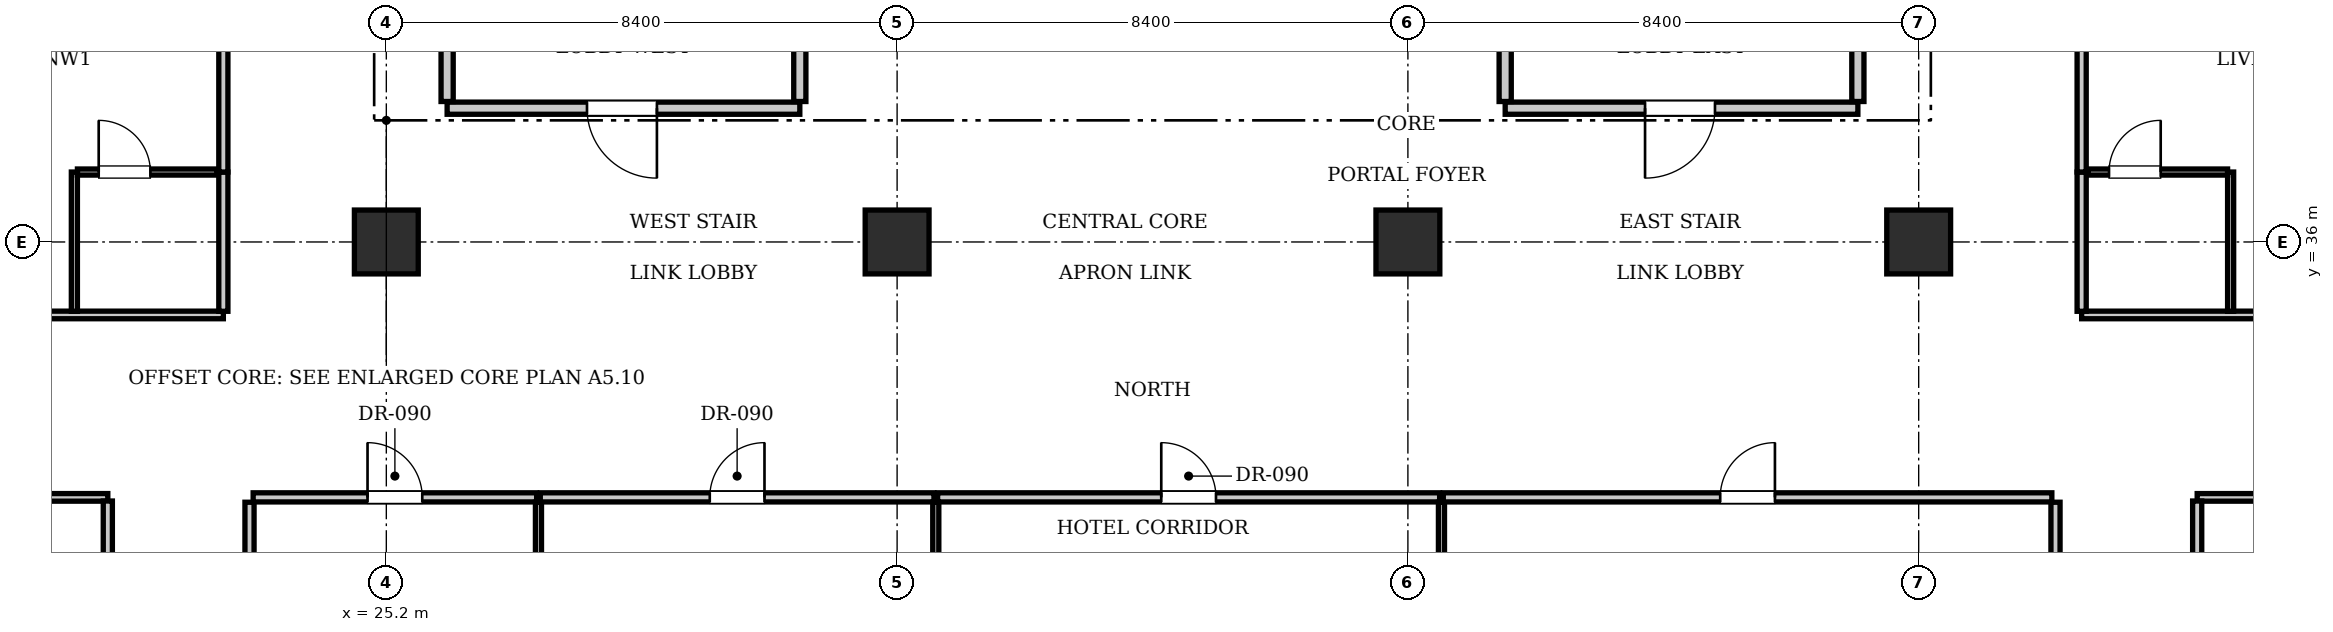
"""IFC4 building model, lengths in metres.
Left out: names, types, materials, properties, quantities, classifications, styles, units other than length and angle.
Written with IfcOpenShell. Run it as: python <this file> out.ifc"""

import sys

from ifc_helpers import new_model, si_unit, direction, frame, frame_2d, origin, origin_2d, place, context, subcontext, project, spatial, rectangle, extrude, element, fill, save


model = new_model("IFC4")
c1 = context("Model", 3, precision=1e-05, world=origin(), true_north=direction((0.0, 1.0)))
c2 = subcontext(c1, "Body", "Model", "MODEL_VIEW")
j1 = project(units=[si_unit("LENGTHUNIT", "METRE"), si_unit("PLANEANGLEUNIT", "RADIAN")], contexts=[c1])
p1 = place(None, origin())
s1 = spatial("IfcSite", under=j1, at=p1, CompositionType="ELEMENT")
p2 = place(p1, origin())
s2 = spatial("IfcBuilding", under=s1, at=p2, CompositionType="ELEMENT")
p3 = place(p2, frame((0.0, 0.0, 92.4)))
s3 = spatial("IfcBuildingStorey", under=s2, at=p3, CompositionType="ELEMENT", Elevation=92.4)
for number, where, z_axis, x_axis in (
    (1, (25.2, 36.0, 0.0), (0.0, 0.0, 1.0), (1.0, 0.0, 0.0)),
    (2, (33.6, 36.0, 0.0), (0.0, 0.0, 1.0), (1.0, 0.0, 0.0)),
    (3, (42.0, 36.0, 0.0), (0.0, 0.0, 1.0), (1.0, 0.0, 0.0)),
    (4, (50.4, 36.0, 0.0), (0.0, 0.0, 1.0), (1.0, 0.0, 0.0)),
):
    element("IfcColumn", number, at=place(p3, frame(where, z_axis=z_axis, x_axis=x_axis)), inside=s3, PredefinedType="COLUMN", context=c2, shape_type="SweptSolid", body=[
        extrude(rectangle(XDim=1.05, YDim=1.05, at=origin_2d()), origin(), (0.0, 0.0, 1.0), 3.85),
    ])
p4 = place(p3, frame((26.2, 38.2, 0.0), z_axis=(0.0, 0.0, 1.0), x_axis=(1.0, 0.0, 0.0)))
e5 = element("IfcWall", 5, at=p4, inside=s3, PredefinedType="PARTITIONING", context=c2, shape_type="SweptSolid", body=[
    extrude(rectangle(XDim=5.8, YDim=0.2, at=frame_2d((2.9, 0.0))), origin(), (0.0, 0.0, 1.0), 3.61),
])
p5 = place(p4, frame((2.3, 0.0, 0.0)))
e6 = element("IfcOpeningElement", 6, at=p5, cuts=e5, PredefinedType="OPENING", context=c2, shape_type="SweptSolid", body=[
    extrude(rectangle(XDim=1.15, YDim=2.15, at=frame_2d((0.575, 1.075))), frame((0.0, 0.11, 0.0), z_axis=(0.0, -1.0, 0.0), x_axis=(1.0, 0.0, 0.0)), (0.0, 0.0, 1.0), 0.22),
])
for number, where, z_axis, x_axis in (
    (7, (26.2, 38.31, 0.0), (0.0, 0.0, 1.0), (0.0, 1.0, 0.0)),
    (8, (32.0, 38.31, 0.0), (0.0, 0.0, 1.0), (0.0, 1.0, 0.0)),
):
    element("IfcWall", number, at=place(p3, frame(where, z_axis=z_axis, x_axis=x_axis)), inside=s3, PredefinedType="PARTITIONING", context=c2, shape_type="SweptSolid", body=[
        extrude(rectangle(XDim=3.07, YDim=0.2, at=frame_2d((1.535, 0.0))), origin(), (0.0, 0.0, 1.0), 3.61),
    ])
p6 = place(p3, frame((43.6, 38.2, 0.0), z_axis=(0.0, 0.0, 1.0), x_axis=(1.0, 0.0, 0.0)))
e9 = element("IfcWall", 9, at=p6, inside=s3, PredefinedType="PARTITIONING", context=c2, shape_type="SweptSolid", body=[
    extrude(rectangle(XDim=5.8, YDim=0.2, at=frame_2d((2.9, 0.0))), origin(), (0.0, 0.0, 1.0), 3.61),
])
p7 = place(p6, frame((2.3, 0.0, 0.0)))
e10 = element("IfcOpeningElement", 10, at=p7, cuts=e9, PredefinedType="OPENING", context=c2, shape_type="SweptSolid", body=[
    extrude(rectangle(XDim=1.15, YDim=2.15, at=frame_2d((0.575, 1.075))), frame((0.0, 0.11, 0.0), z_axis=(0.0, -1.0, 0.0), x_axis=(1.0, 0.0, 0.0)), (0.0, 0.0, 1.0), 0.22),
])
for number, where, z_axis, x_axis in (
    (11, (43.6, 38.31, 0.0), (0.0, 0.0, 1.0), (0.0, 1.0, 0.0)),
    (12, (49.4, 38.31, 0.0), (0.0, 0.0, 1.0), (0.0, 1.0, 0.0)),
):
    element("IfcWall", number, at=place(p3, frame(where, z_axis=z_axis, x_axis=x_axis)), inside=s3, PredefinedType="PARTITIONING", context=c2, shape_type="SweptSolid", body=[
        extrude(rectangle(XDim=3.07, YDim=0.2, at=frame_2d((1.535, 0.0))), origin(), (0.0, 0.0, 1.0), 3.61),
    ])
for number, where, z_axis, x_axis in (
    (13, (22.95, 23.28, 0.0), (0.0, 0.0, 1.0), (0.0, 1.0, 0.0)),
    (14, (52.65, 23.28, 0.0), (0.0, 0.0, 1.0), (0.0, 1.0, 0.0)),
):
    element("IfcWall", number, at=place(p3, frame(where, z_axis=z_axis, x_axis=x_axis)), inside=s3, PredefinedType="PARTITIONING", context=c2, shape_type="SweptSolid", body=[
        extrude(rectangle(XDim=8.44, YDim=0.15, at=frame_2d((4.22, 0.0))), origin(), (0.0, 0.0, 1.0), 3.61),
    ])
p8 = place(p3, frame((23.01, 31.8, 0.0), z_axis=(0.0, 0.0, 1.0), x_axis=(1.0, 0.0, 0.0)))
e15 = element("IfcWall", 15, at=p8, inside=s3, PredefinedType="PARTITIONING", context=c2, shape_type="SweptSolid", body=[
    extrude(rectangle(XDim=4.662, YDim=0.15, at=frame_2d((2.331, 0.0))), origin(), (0.0, 0.0, 1.0), 3.61),
])
p9 = place(p8, frame((1.881, 0.0, 0.0)))
e16 = element("IfcOpeningElement", 16, at=p9, cuts=e15, PredefinedType="OPENING", context=c2, shape_type="SweptSolid", body=[
    extrude(rectangle(XDim=0.9, YDim=2.1, at=frame_2d((0.45, 1.05))), frame((0.0, 0.085, 0.0), z_axis=(0.0, -1.0, 0.0), x_axis=(1.0, 0.0, 0.0)), (0.0, 0.0, 1.0), 0.17),
])
p10 = place(p3, frame((27.702, 23.28, 0.0), z_axis=(0.0, 0.0, 1.0), x_axis=(0.0, 1.0, 0.0)))
e17 = element("IfcWall", 17, at=p10, inside=s3, PredefinedType="PARTITIONING", context=c2, shape_type="SweptSolid", body=[
    extrude(rectangle(XDim=8.44, YDim=0.1, at=frame_2d((4.22, 0.0))), origin(), (0.0, 0.0, 1.0), 3.61),
])
p11 = place(p3, frame((27.732, 31.8, 0.0), z_axis=(0.0, 0.0, 1.0), x_axis=(1.0, 0.0, 0.0)))
e18 = element("IfcWall", 18, at=p11, inside=s3, PredefinedType="PARTITIONING", context=c2, shape_type="SweptSolid", body=[
    extrude(rectangle(XDim=6.474, YDim=0.15, at=frame_2d((3.237, 0.0))), origin(), (0.0, 0.0, 1.0), 3.61),
])
p12 = place(p11, frame((2.787, 0.0, 0.0)))
e19 = element("IfcOpeningElement", 19, at=p12, cuts=e18, PredefinedType="OPENING", context=c2, shape_type="SweptSolid", body=[
    extrude(rectangle(XDim=0.9, YDim=2.1, at=frame_2d((0.45, 1.05))), frame((0.0, 0.085, 0.0), z_axis=(0.0, -1.0, 0.0), x_axis=(1.0, 0.0, 0.0)), (0.0, 0.0, 1.0), 0.17),
])
p13 = place(p3, frame((34.236, 23.28, 0.0), z_axis=(0.0, 0.0, 1.0), x_axis=(0.0, 1.0, 0.0)))
e20 = element("IfcWall", 20, at=p13, inside=s3, PredefinedType="PARTITIONING", context=c2, shape_type="SweptSolid", body=[
    extrude(rectangle(XDim=8.44, YDim=0.1, at=frame_2d((4.22, 0.0))), origin(), (0.0, 0.0, 1.0), 3.61),
])
p14 = place(p3, frame((34.266, 31.8, 0.0), z_axis=(0.0, 0.0, 1.0), x_axis=(1.0, 0.0, 0.0)))
e21 = element("IfcWall", 21, at=p14, inside=s3, PredefinedType="PARTITIONING", context=c2, shape_type="SweptSolid", body=[
    extrude(rectangle(XDim=8.256, YDim=0.15, at=frame_2d((4.128, 0.0))), origin(), (0.0, 0.0, 1.0), 3.61),
])
p15 = place(p14, frame((3.678, 0.0, 0.0)))
e22 = element("IfcOpeningElement", 22, at=p15, cuts=e21, PredefinedType="OPENING", context=c2, shape_type="SweptSolid", body=[
    extrude(rectangle(XDim=0.9, YDim=2.1, at=frame_2d((0.45, 1.05))), frame((0.0, 0.085, 0.0), z_axis=(0.0, -1.0, 0.0), x_axis=(1.0, 0.0, 0.0)), (0.0, 0.0, 1.0), 0.17),
])
p16 = place(p3, frame((42.552, 23.28, 0.0), z_axis=(0.0, 0.0, 1.0), x_axis=(0.0, 1.0, 0.0)))
e23 = element("IfcWall", 23, at=p16, inside=s3, PredefinedType="PARTITIONING", context=c2, shape_type="SweptSolid", body=[
    extrude(rectangle(XDim=8.44, YDim=0.1, at=frame_2d((4.22, 0.0))), origin(), (0.0, 0.0, 1.0), 3.61),
])
p17 = place(p3, frame((42.582, 31.8, 0.0), z_axis=(0.0, 0.0, 1.0), x_axis=(1.0, 0.0, 0.0)))
e24 = element("IfcWall", 24, at=p17, inside=s3, PredefinedType="PARTITIONING", context=c2, shape_type="SweptSolid", body=[
    extrude(rectangle(XDim=10.008, YDim=0.15, at=frame_2d((5.004, 0.0))), origin(), (0.0, 0.0, 1.0), 3.61),
])
p18 = place(p17, frame((4.554, 0.0, 0.0)))
e25 = element("IfcOpeningElement", 25, at=p18, cuts=e24, PredefinedType="OPENING", context=c2, shape_type="SweptSolid", body=[
    extrude(rectangle(XDim=0.9, YDim=2.1, at=frame_2d((0.45, 1.05))), frame((0.0, 0.085, 0.0), z_axis=(0.0, -1.0, 0.0), x_axis=(1.0, 0.0, 0.0)), (0.0, 0.0, 1.0), 0.17),
])
p19 = place(p3, frame((10.9, 31.8, 0.0), z_axis=(0.0, 0.0, 1.0), x_axis=(1.0, 0.0, 0.0)))
e26 = element("IfcWall", 26, at=p19, inside=s3, PredefinedType="PARTITIONING", context=c2, shape_type="SweptSolid", body=[
    extrude(rectangle(XDim=9.72, YDim=0.125, at=frame_2d((4.86, 0.0))), origin(), (0.0, 0.0, 1.0), 3.61),
])
p20 = place(p3, frame((54.98, 31.8, 0.0), z_axis=(0.0, 0.0, 1.0), x_axis=(1.0, 0.0, 0.0)))
e27 = element("IfcWall", 27, at=p20, inside=s3, PredefinedType="PARTITIONING", context=c2, shape_type="SweptSolid", body=[
    extrude(rectangle(XDim=9.72, YDim=0.125, at=frame_2d((4.86, 0.0))), origin(), (0.0, 0.0, 1.0), 3.61),
])
for number, where, z_axis, x_axis in (
    (28, (20.62, 29.72, 0.0), (0.0, 0.0, 1.0), (0.0, 1.0, 0.0)),
    (29, (54.98, 29.72, 0.0), (0.0, 0.0, 1.0), (0.0, 1.0, 0.0)),
):
    element("IfcWall", number, at=place(p3, frame(where, z_axis=z_axis, x_axis=x_axis)), inside=s3, PredefinedType="PARTITIONING", context=c2, shape_type="SweptSolid", body=[
        extrude(rectangle(XDim=2.02, YDim=0.15, at=frame_2d((1.01, 0.0))), origin(), (0.0, 0.0, 1.0), 3.61),
    ])
p21 = place(p3, frame((10.9, 34.8, 0.0), z_axis=(0.0, 0.0, 1.0), x_axis=(1.0, 0.0, 0.0)))
e30 = element("IfcWall", 30, at=p21, inside=s3, PredefinedType="PARTITIONING", context=c2, shape_type="SweptSolid", body=[
    extrude(rectangle(XDim=11.62, YDim=0.125, at=frame_2d((5.81, 0.0))), origin(), (0.0, 0.0, 1.0), 3.61),
])
p22 = place(p3, frame((53.08, 34.8, 0.0), z_axis=(0.0, 0.0, 1.0), x_axis=(1.0, 0.0, 0.0)))
e31 = element("IfcWall", 31, at=p22, inside=s3, PredefinedType="PARTITIONING", context=c2, shape_type="SweptSolid", body=[
    extrude(rectangle(XDim=11.62, YDim=0.125, at=frame_2d((5.81, 0.0))), origin(), (0.0, 0.0, 1.0), 3.61),
])
p23 = place(p3, frame((22.52, 34.86, 0.0), z_axis=(0.0, 0.0, 1.0), x_axis=(0.0, 1.0, 0.0)))
e32 = element("IfcWall", 32, at=p23, inside=s3, PredefinedType="PARTITIONING", context=c2, shape_type="SweptSolid", body=[
    extrude(rectangle(XDim=2.29, YDim=0.15, at=frame_2d((1.145, 0.0))), origin(), (0.0, 0.0, 1.0), 3.61),
])
p24 = place(p3, frame((22.52, 37.15, 0.0), z_axis=(0.0, 0.0, 1.0), x_axis=(0.0, 1.0, 0.0)))
e33 = element("IfcWall", 33, at=p24, inside=s3, PredefinedType="PARTITIONING", context=c2, shape_type="SweptSolid", body=[
    extrude(rectangle(XDim=5.359, YDim=0.15, at=frame_2d((2.679, 0.0))), origin(), (0.0, 0.0, 1.0), 3.61),
])
p25 = place(p24, frame((2.204, 0.0, 0.0)))
e34 = element("IfcOpeningElement", 34, at=p25, cuts=e33, PredefinedType="OPENING", context=c2, shape_type="SweptSolid", body=[
    extrude(rectangle(XDim=0.95, YDim=2.15, at=frame_2d((0.475, 1.075))), frame((0.0, 0.085, 0.0), z_axis=(0.0, -1.0, 0.0), x_axis=(1.0, 0.0, 0.0)), (0.0, 0.0, 1.0), 0.17),
])
p26 = place(p3, frame((20.07, 34.86, 0.0), z_axis=(0.0, 0.0, 1.0), x_axis=(0.0, 1.0, 0.0)))
e35 = element("IfcWall", 35, at=p26, inside=s3, PredefinedType="PARTITIONING", context=c2, shape_type="SweptSolid", body=[
    extrude(rectangle(XDim=2.29, YDim=0.1, at=frame_2d((1.145, 0.0))), origin(), (0.0, 0.0, 1.0), 3.61),
])
p27 = place(p3, frame((20.12, 37.15, 0.0), z_axis=(0.0, 0.0, 1.0), x_axis=(1.0, 0.0, 0.0)))
e36 = element("IfcWall", 36, at=p27, inside=s3, PredefinedType="PARTITIONING", context=c2, shape_type="SweptSolid", body=[
    extrude(rectangle(XDim=2.3, YDim=0.1, at=frame_2d((1.15, 0.0))), origin(), (0.0, 0.0, 1.0), 3.61),
])
p28 = place(p27, frame((0.35, 0.0, 0.0)))
e37 = element("IfcOpeningElement", 37, at=p28, cuts=e36, PredefinedType="OPENING", context=c2, shape_type="SweptSolid", body=[
    extrude(rectangle(XDim=0.85, YDim=2.1, at=frame_2d((0.425, 1.05))), frame((0.0, 0.06, 0.0), z_axis=(0.0, -1.0, 0.0), x_axis=(1.0, 0.0, 0.0)), (0.0, 0.0, 1.0), 0.12),
])
p29 = place(p3, frame((53.08, 34.86, 0.0), z_axis=(0.0, 0.0, 1.0), x_axis=(0.0, 1.0, 0.0)))
e38 = element("IfcWall", 38, at=p29, inside=s3, PredefinedType="PARTITIONING", context=c2, shape_type="SweptSolid", body=[
    extrude(rectangle(XDim=2.29, YDim=0.15, at=frame_2d((1.145, 0.0))), origin(), (0.0, 0.0, 1.0), 3.61),
])
p30 = place(p3, frame((53.08, 37.15, 0.0), z_axis=(0.0, 0.0, 1.0), x_axis=(0.0, 1.0, 0.0)))
e39 = element("IfcWall", 39, at=p30, inside=s3, PredefinedType="PARTITIONING", context=c2, shape_type="SweptSolid", body=[
    extrude(rectangle(XDim=5.359, YDim=0.15, at=frame_2d((2.679, 0.0))), origin(), (0.0, 0.0, 1.0), 3.61),
])
p31 = place(p30, frame((2.204, 0.0, 0.0)))
e40 = element("IfcOpeningElement", 40, at=p31, cuts=e39, PredefinedType="OPENING", context=c2, shape_type="SweptSolid", body=[
    extrude(rectangle(XDim=0.95, YDim=2.15, at=frame_2d((0.475, 1.075))), frame((0.0, 0.085, 0.0), z_axis=(0.0, -1.0, 0.0), x_axis=(1.0, 0.0, 0.0)), (0.0, 0.0, 1.0), 0.17),
])
p32 = place(p3, frame((55.53, 34.86, 0.0), z_axis=(0.0, 0.0, 1.0), x_axis=(0.0, 1.0, 0.0)))
e41 = element("IfcWall", 41, at=p32, inside=s3, PredefinedType="PARTITIONING", context=c2, shape_type="SweptSolid", body=[
    extrude(rectangle(XDim=2.29, YDim=0.1, at=frame_2d((1.145, 0.0))), origin(), (0.0, 0.0, 1.0), 3.61),
])
p33 = place(p3, frame((53.18, 37.15, 0.0), z_axis=(0.0, 0.0, 1.0), x_axis=(1.0, 0.0, 0.0)))
e42 = element("IfcWall", 42, at=p33, inside=s3, PredefinedType="PARTITIONING", context=c2, shape_type="SweptSolid", body=[
    extrude(rectangle(XDim=2.3, YDim=0.1, at=frame_2d((1.15, 0.0))), origin(), (0.0, 0.0, 1.0), 3.61),
])
p34 = place(p33, frame((0.35, 0.0, 0.0)))
e43 = element("IfcOpeningElement", 43, at=p34, cuts=e42, PredefinedType="OPENING", context=c2, shape_type="SweptSolid", body=[
    extrude(rectangle(XDim=0.85, YDim=2.1, at=frame_2d((0.425, 1.05))), frame((0.0, 0.06, 0.0), z_axis=(0.0, -1.0, 0.0), x_axis=(1.0, 0.0, 0.0)), (0.0, 0.0, 1.0), 0.12),
])
p35 = place(p5, frame((1.15, 0.0, 0.0), z_axis=(0.0, 0.0, 1.0), x_axis=(-1.0, 0.0, 0.0)))
e44 = element("IfcDoor", 44, at=p35, inside=s3, OperationType="SINGLE_SWING_LEFT", PredefinedType="DOOR", context=c2, shape_type="SweptSolid", body=[
    extrude(rectangle(XDim=1.15, YDim=2.15, at=frame_2d((0.575, 1.075))), frame((0.0, 0.025, 0.0), z_axis=(0.0, -1.0, 0.0), x_axis=(1.0, 0.0, 0.0)), (0.0, 0.0, 1.0), 0.05),
])
fill(e6, e44)
p36 = place(p7, frame((1.15, 0.0, 0.0), z_axis=(0.0, 0.0, 1.0), x_axis=(-1.0, 0.0, 0.0)))
e45 = element("IfcDoor", 45, at=p36, inside=s3, OperationType="SINGLE_SWING_RIGHT", PredefinedType="DOOR", context=c2, shape_type="SweptSolid", body=[
    extrude(rectangle(XDim=1.15, YDim=2.15, at=frame_2d((0.575, 1.075))), frame((0.0, 0.025, 0.0), z_axis=(0.0, -1.0, 0.0), x_axis=(1.0, 0.0, 0.0)), (0.0, 0.0, 1.0), 0.05),
])
fill(e10, e45)
p37 = place(p9, origin())
e46 = element("IfcDoor", 46, at=p37, inside=s3, OperationType="SINGLE_SWING_LEFT", PredefinedType="DOOR", context=c2, shape_type="SweptSolid", body=[
    extrude(rectangle(XDim=0.9, YDim=2.1, at=frame_2d((0.45, 1.05))), frame((0.0, 0.025, 0.0), z_axis=(0.0, -1.0, 0.0), x_axis=(1.0, 0.0, 0.0)), (0.0, 0.0, 1.0), 0.05),
])
fill(e16, e46)
p38 = place(p12, origin())
e47 = element("IfcDoor", 47, at=p38, inside=s3, OperationType="SINGLE_SWING_RIGHT", PredefinedType="DOOR", context=c2, shape_type="SweptSolid", body=[
    extrude(rectangle(XDim=0.9, YDim=2.1, at=frame_2d((0.45, 1.05))), frame((0.0, 0.025, 0.0), z_axis=(0.0, -1.0, 0.0), x_axis=(1.0, 0.0, 0.0)), (0.0, 0.0, 1.0), 0.05),
])
fill(e19, e47)
p39 = place(p15, origin())
e48 = element("IfcDoor", 48, at=p39, inside=s3, OperationType="SINGLE_SWING_LEFT", PredefinedType="DOOR", context=c2, shape_type="SweptSolid", body=[
    extrude(rectangle(XDim=0.9, YDim=2.1, at=frame_2d((0.45, 1.05))), frame((0.0, 0.025, 0.0), z_axis=(0.0, -1.0, 0.0), x_axis=(1.0, 0.0, 0.0)), (0.0, 0.0, 1.0), 0.05),
])
fill(e22, e48)
p40 = place(p18, origin())
e49 = element("IfcDoor", 49, at=p40, inside=s3, OperationType="SINGLE_SWING_RIGHT", PredefinedType="DOOR", context=c2, shape_type="SweptSolid", body=[
    extrude(rectangle(XDim=0.9, YDim=2.1, at=frame_2d((0.45, 1.05))), frame((0.0, 0.025, 0.0), z_axis=(0.0, -1.0, 0.0), x_axis=(1.0, 0.0, 0.0)), (0.0, 0.0, 1.0), 0.05),
])
fill(e25, e49)
p41 = place(p28, origin())
e50 = element("IfcDoor", 50, at=p41, inside=s3, OperationType="SINGLE_SWING_LEFT", PredefinedType="DOOR", context=c2, shape_type="SweptSolid", body=[
    extrude(rectangle(XDim=0.85, YDim=2.1, at=frame_2d((0.425, 1.05))), frame((0.0, 0.025, 0.0), z_axis=(0.0, -1.0, 0.0), x_axis=(1.0, 0.0, 0.0)), (0.0, 0.0, 1.0), 0.05),
])
fill(e37, e50)
p42 = place(p34, origin())
e51 = element("IfcDoor", 51, at=p42, inside=s3, OperationType="SINGLE_SWING_RIGHT", PredefinedType="DOOR", context=c2, shape_type="SweptSolid", body=[
    extrude(rectangle(XDim=0.85, YDim=2.1, at=frame_2d((0.425, 1.05))), frame((0.0, 0.025, 0.0), z_axis=(0.0, -1.0, 0.0), x_axis=(1.0, 0.0, 0.0)), (0.0, 0.0, 1.0), 0.05),
])
fill(e43, e51)
save(model, sys.argv[1])
